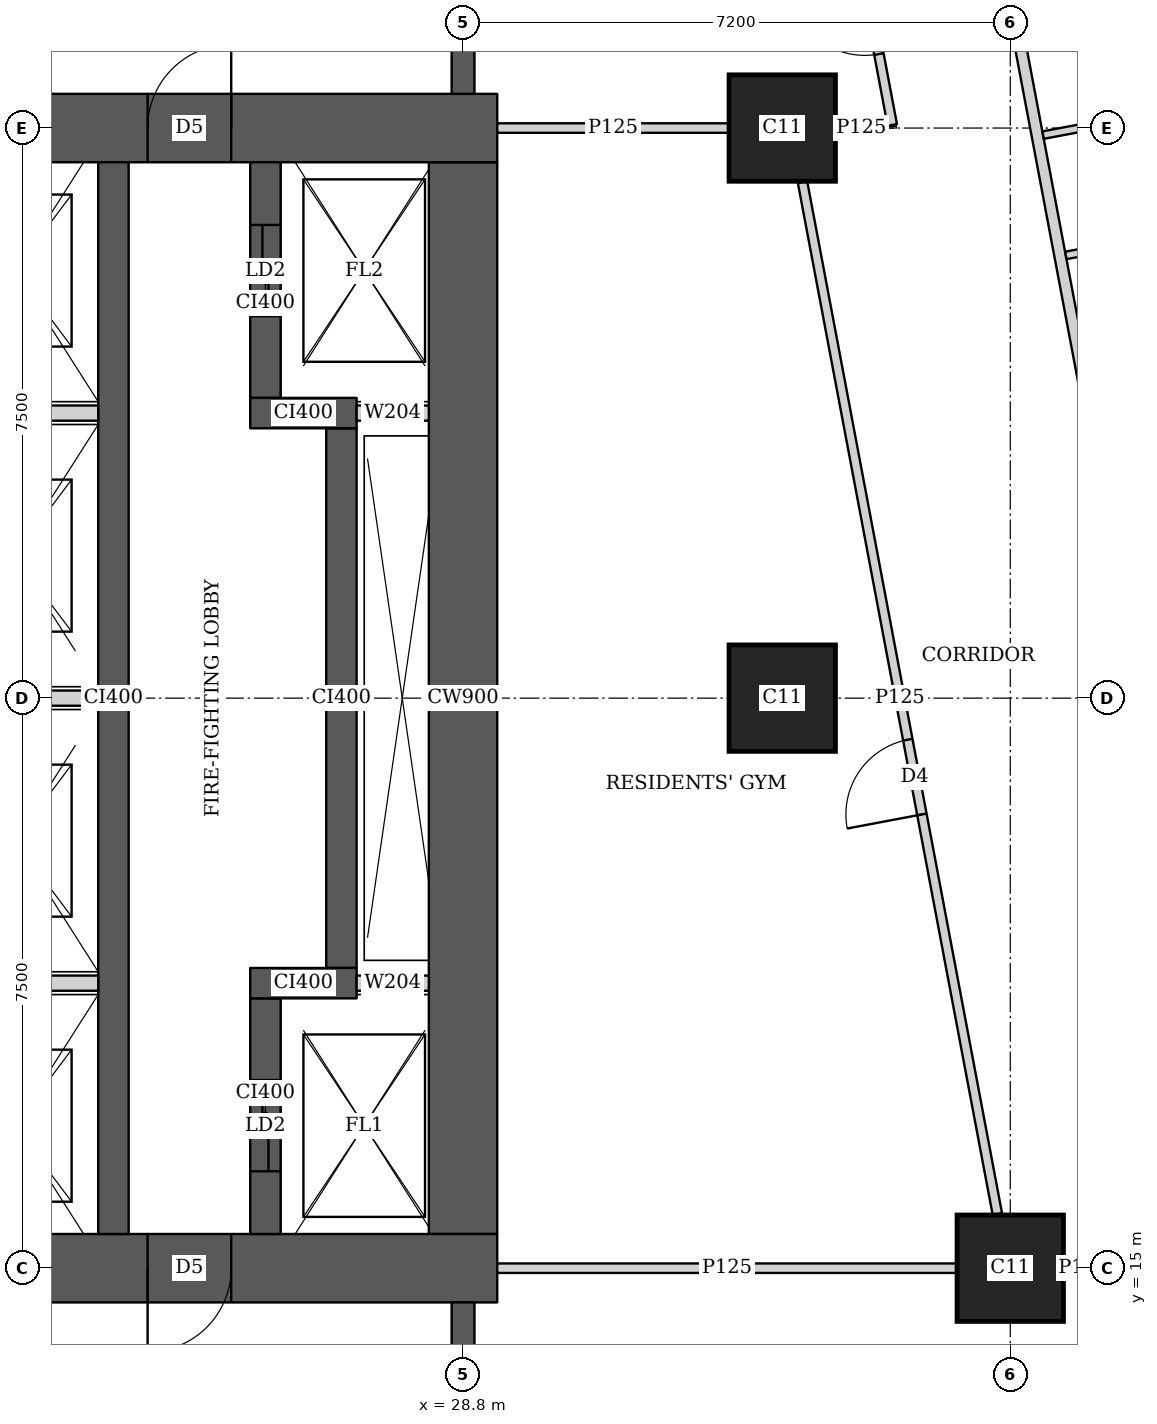
"""IFC4 building model, lengths in metres.
Left out: names, types, materials, properties, quantities, classifications, styles, units other than length and angle.
Written with IfcOpenShell. Run it as: python <this file> out.ifc"""

import sys

from ifc_helpers import new_model, si_unit, direction, frame, frame_2d, origin, origin_2d, place, context, subcontext, project, spatial, rectangle, extrude, element, fill, save


model = new_model("IFC4")
c1 = context("Model", 3, precision=1e-05, world=origin(), true_north=direction((0.0, 1.0)))
c2 = subcontext(c1, "Body", "Model", "MODEL_VIEW")
j1 = project(units=[si_unit("LENGTHUNIT", "METRE"), si_unit("PLANEANGLEUNIT", "RADIAN")], contexts=[c1])
p1 = place(None, origin())
s1 = spatial("IfcSite", under=j1, at=p1, CompositionType="ELEMENT")
p2 = place(p1, origin())
s2 = spatial("IfcBuilding", under=s1, at=p2, CompositionType="ELEMENT")
p3 = place(p2, frame((0.0, 0.0, 292.85)))
s3 = spatial("IfcBuildingStorey", under=s2, at=p3, CompositionType="ELEMENT", Elevation=292.85)
for number, where, z_axis, x_axis in (
    (1, (36.0, 15.0, 0.0), (0.0, 0.0, 1.0), (1.0, 0.0, 0.0)),
    (2, (33.0, 22.5, 0.0), (0.0, 0.0, 1.0), (1.0, 0.0, 0.0)),
    (3, (33.0, 30.0, 0.0), (0.0, 0.0, 1.0), (1.0, 0.0, 0.0)),
):
    element("IfcColumn", number, at=place(p3, frame(where, z_axis=z_axis, x_axis=x_axis)), inside=s3, PredefinedType="COLUMN", context=c2, shape_type="SweptSolid", body=[
        extrude(rectangle(XDim=1.4, YDim=1.4, at=origin_2d()), origin(), (0.0, 0.0, 1.0), 3.75),
    ])
p4 = place(p3, frame((13.95, 15.0, 0.0), z_axis=(0.0, 0.0, 1.0), x_axis=(1.0, 0.0, 0.0)))
e4 = element("IfcWall", 4, at=p4, inside=s3, PredefinedType="SHEAR", context=c2, shape_type="SweptSolid", body=[
    extrude(rectangle(XDim=15.3, YDim=0.9, at=frame_2d((7.65, 0.0))), origin(), (0.0, 0.0, 1.0), 3.75),
])
p5 = place(p4, frame((4.45, 0.0, 0.0)))
e5 = element("IfcOpeningElement", 5, at=p5, cuts=e4, PredefinedType="OPENING", context=c2, shape_type="SweptSolid", body=[
    extrude(rectangle(XDim=1.8, YDim=2.1, at=frame_2d((0.9, 1.05))), frame((0.0, 0.46, 0.0), z_axis=(0.0, -1.0, 0.0), x_axis=(1.0, 0.0, 0.0)), (0.0, 0.0, 1.0), 0.92),
])
p6 = place(p4, frame((10.7, 0.0, 0.0)))
e6 = element("IfcOpeningElement", 6, at=p6, cuts=e4, PredefinedType="OPENING", context=c2, shape_type="SweptSolid", body=[
    extrude(rectangle(XDim=1.1, YDim=2.1, at=frame_2d((0.55, 1.05))), frame((0.0, 0.46, 0.0), z_axis=(0.0, -1.0, 0.0), x_axis=(1.0, 0.0, 0.0)), (0.0, 0.0, 1.0), 0.92),
])
p7 = place(p3, frame((13.95, 30.0, 0.0), z_axis=(0.0, 0.0, 1.0), x_axis=(1.0, 0.0, 0.0)))
e7 = element("IfcWall", 7, at=p7, inside=s3, PredefinedType="SHEAR", context=c2, shape_type="SweptSolid", body=[
    extrude(rectangle(XDim=15.3, YDim=0.9, at=frame_2d((7.65, 0.0))), origin(), (0.0, 0.0, 1.0), 3.75),
])
p8 = place(p7, frame((4.45, 0.0, 0.0)))
e8 = element("IfcOpeningElement", 8, at=p8, cuts=e7, PredefinedType="OPENING", context=c2, shape_type="SweptSolid", body=[
    extrude(rectangle(XDim=1.8, YDim=2.1, at=frame_2d((0.9, 1.05))), frame((0.0, 0.46, 0.0), z_axis=(0.0, -1.0, 0.0), x_axis=(1.0, 0.0, 0.0)), (0.0, 0.0, 1.0), 0.92),
])
p9 = place(p7, frame((10.7, 0.0, 0.0)))
e9 = element("IfcOpeningElement", 9, at=p9, cuts=e7, PredefinedType="OPENING", context=c2, shape_type="SweptSolid", body=[
    extrude(rectangle(XDim=1.1, YDim=2.1, at=frame_2d((0.55, 1.05))), frame((0.0, 0.46, 0.0), z_axis=(0.0, -1.0, 0.0), x_axis=(1.0, 0.0, 0.0)), (0.0, 0.0, 1.0), 0.92),
])
p10 = place(p3, frame((28.8, 15.45, 0.0), z_axis=(0.0, 0.0, 1.0), x_axis=(0.0, 1.0, 0.0)))
e10 = element("IfcWall", 10, at=p10, inside=s3, PredefinedType="SHEAR", context=c2, shape_type="SweptSolid", body=[
    extrude(rectangle(XDim=14.1, YDim=0.9, at=frame_2d((7.05, 0.0))), origin(), (0.0, 0.0, 1.0), 3.75),
])
p11 = place(p3, frame((24.2, 15.45, 0.0), z_axis=(0.0, 0.0, 1.0), x_axis=(0.0, 1.0, 0.0)))
e11 = element("IfcWall", 11, at=p11, inside=s3, PredefinedType="SHEAR", context=c2, shape_type="SweptSolid", body=[
    extrude(rectangle(XDim=14.1, YDim=0.4, at=frame_2d((7.05, 0.0))), origin(), (0.0, 0.0, 1.0), 3.75),
])
p12 = place(p3, frame((26.2, 15.45, 0.0), z_axis=(0.0, 0.0, 1.0), x_axis=(0.0, 1.0, 0.0)))
e12 = element("IfcWall", 12, at=p12, inside=s3, PredefinedType="SHEAR", context=c2, shape_type="SweptSolid", body=[
    extrude(rectangle(XDim=3.1, YDim=0.4, at=frame_2d((1.55, 0.0))), origin(), (0.0, 0.0, 1.0), 3.75),
])
p13 = place(p12, frame((0.825, 0.0, 0.0)))
e13 = element("IfcOpeningElement", 13, at=p13, cuts=e12, PredefinedType="OPENING", context=c2, shape_type="SweptSolid", body=[
    extrude(rectangle(XDim=1.2, YDim=2.1, at=frame_2d((0.6, 1.05))), frame((0.0, 0.21, 0.0), z_axis=(0.0, -1.0, 0.0), x_axis=(1.0, 0.0, 0.0)), (0.0, 0.0, 1.0), 0.42),
])
p14 = place(p3, frame((26.0, 18.75, 0.0), z_axis=(0.0, 0.0, 1.0), x_axis=(1.0, 0.0, 0.0)))
e14 = element("IfcWall", 14, at=p14, inside=s3, PredefinedType="SHEAR", context=c2, shape_type="SweptSolid", body=[
    extrude(rectangle(XDim=1.4, YDim=0.4, at=frame_2d((0.7, 0.0))), origin(), (0.0, 0.0, 1.0), 3.75),
])
p15 = place(p3, frame((27.2, 18.95, 0.0), z_axis=(0.0, 0.0, 1.0), x_axis=(0.0, 1.0, 0.0)))
e15 = element("IfcWall", 15, at=p15, inside=s3, PredefinedType="SHEAR", context=c2, shape_type="SweptSolid", body=[
    extrude(rectangle(XDim=7.1, YDim=0.4, at=frame_2d((3.55, 0.0))), origin(), (0.0, 0.0, 1.0), 3.75),
])
p16 = place(p3, frame((26.0, 26.25, 0.0), z_axis=(0.0, 0.0, 1.0), x_axis=(1.0, 0.0, 0.0)))
e16 = element("IfcWall", 16, at=p16, inside=s3, PredefinedType="SHEAR", context=c2, shape_type="SweptSolid", body=[
    extrude(rectangle(XDim=1.4, YDim=0.4, at=frame_2d((0.7, 0.0))), origin(), (0.0, 0.0, 1.0), 3.75),
])
p17 = place(p3, frame((26.2, 26.45, 0.0), z_axis=(0.0, 0.0, 1.0), x_axis=(0.0, 1.0, 0.0)))
e17 = element("IfcWall", 17, at=p17, inside=s3, PredefinedType="SHEAR", context=c2, shape_type="SweptSolid", body=[
    extrude(rectangle(XDim=3.1, YDim=0.4, at=frame_2d((1.55, 0.0))), origin(), (0.0, 0.0, 1.0), 3.75),
])
p18 = place(p17, frame((1.075, 0.0, 0.0)))
e18 = element("IfcOpeningElement", 18, at=p18, cuts=e17, PredefinedType="OPENING", context=c2, shape_type="SweptSolid", body=[
    extrude(rectangle(XDim=1.2, YDim=2.1, at=frame_2d((0.6, 1.05))), frame((0.0, 0.21, 0.0), z_axis=(0.0, -1.0, 0.0), x_axis=(1.0, 0.0, 0.0)), (0.0, 0.0, 1.0), 0.42),
])
for number, where, z_axis, x_axis in (
    (19, (28.8, 10.35, 0.0), (0.0, 0.0, 1.0), (0.0, 1.0, 0.0)),
    (20, (28.8, 30.45, 0.0), (0.0, 0.0, 1.0), (0.0, 1.0, 0.0)),
):
    element("IfcWall", number, at=place(p3, frame(where, z_axis=z_axis, x_axis=x_axis)), inside=s3, PredefinedType="SHEAR", context=c2, shape_type="SweptSolid", body=[
        extrude(rectangle(XDim=4.2, YDim=0.3, at=frame_2d((2.1, 0.0))), origin(), (0.0, 0.0, 1.0), 3.75),
    ])
p19 = place(p3, frame((34.036, 42.186, 0.0), z_axis=(0.0, 0.0, 1.0), x_axis=(0.185593518645, -0.9826266055, 0.0)))
e21 = element("IfcWall", 21, at=p19, inside=s3, PredefinedType="SOLIDWALL", context=c2, shape_type="SweptSolid", body=[
    extrude(rectangle(XDim=35.961, YDim=0.15, at=frame_2d((17.98, 0.0))), origin(), (0.0, 0.0, 1.0), 2.4),
])
p20 = place(p19, frame((19.345, 0.0, 0.0)))
e22 = element("IfcOpeningElement", 22, at=p20, cuts=e21, PredefinedType="OPENING", context=c2, shape_type="SweptSolid", body=[
    extrude(rectangle(XDim=1.0, YDim=2.1, at=frame_2d((0.5, 1.05))), frame((0.0, 0.085, 0.0), z_axis=(0.0, -1.0, 0.0), x_axis=(1.0, 0.0, 0.0)), (0.0, 0.0, 1.0), 0.17),
])
p21 = place(p19, frame((33.774, 0.0, 0.0)))
e23 = element("IfcOpeningElement", 23, at=p21, cuts=e21, PredefinedType="OPENING", context=c2, shape_type="SweptSolid", body=[
    extrude(rectangle(XDim=1.0, YDim=2.1, at=frame_2d((0.5, 1.05))), frame((0.0, 0.085, 0.0), z_axis=(0.0, -1.0, 0.0), x_axis=(1.0, 0.0, 0.0)), (0.0, 0.0, 1.0), 0.17),
])
p22 = place(p3, frame((39.948, 28.932, 0.0), z_axis=(0.0, 0.0, 1.0), x_axis=(-0.982610347627, -0.185679575441, 0.0)))
e24 = element("IfcWall", 24, at=p22, inside=s3, PredefinedType="PARTITIONING", context=c2, shape_type="SweptSolid", body=[
    extrude(rectangle(XDim=3.274, YDim=0.1, at=frame_2d((1.637, 0.0))), origin(), (0.0, 0.0, 1.0), 3.4),
])
p23 = place(p3, frame((39.649, 30.515, 0.0), z_axis=(0.0, 0.0, 1.0), x_axis=(-0.982610347627, -0.185679575441, 0.0)))
e25 = element("IfcWall", 25, at=p23, inside=s3, PredefinedType="PARTITIONING", context=c2, shape_type="SweptSolid", body=[
    extrude(rectangle(XDim=3.274, YDim=0.1, at=frame_2d((1.637, 0.0))), origin(), (0.0, 0.0, 1.0), 2.4),
])
p24 = place(p3, frame((34.448, 30.04, 0.0), z_axis=(0.0, 0.0, 1.0), x_axis=(-0.185749459238, 0.982597139418, 0.0)))
e26 = element("IfcWall", 26, at=p24, inside=s3, PredefinedType="PARTITIONING", context=c2, shape_type="SweptSolid", body=[
    extrude(rectangle(XDim=4.883, YDim=0.125, at=frame_2d((2.441, 0.0))), origin(), (0.0, 0.0, 1.0), 2.4),
])
p25 = place(p24, frame((0.95, 0.0, 0.0)))
e27 = element("IfcOpeningElement", 27, at=p25, cuts=e26, PredefinedType="OPENING", context=c2, shape_type="SweptSolid", body=[
    extrude(rectangle(XDim=1.0, YDim=2.1, at=frame_2d((0.5, 1.05))), frame((0.0, 0.073, 0.0), z_axis=(0.0, -1.0, 0.0), x_axis=(1.0, 0.0, 0.0)), (0.0, 0.0, 1.0), 0.145),
])
p26 = place(p24, frame((3.225, 0.0, 0.0)))
e28 = element("IfcOpeningElement", 28, at=p26, cuts=e26, PredefinedType="OPENING", context=c2, shape_type="SweptSolid", body=[
    extrude(rectangle(XDim=1.0, YDim=2.1, at=frame_2d((0.5, 1.05))), frame((0.0, 0.073, 0.0), z_axis=(0.0, -1.0, 0.0), x_axis=(1.0, 0.0, 0.0)), (0.0, 0.0, 1.0), 0.145),
])
p27 = place(p3, frame((35.83, 15.713, 0.0), z_axis=(0.0, 0.0, 1.0), x_axis=(-0.185534724166, 0.982637708481, 0.0)))
e29 = element("IfcWall", 29, at=p27, inside=s3, PredefinedType="PARTITIONING", context=c2, shape_type="SweptSolid", body=[
    extrude(rectangle(XDim=13.814, YDim=0.125, at=frame_2d((6.907, 0.0))), origin(), (0.0, 0.0, 1.0), 2.4),
])
p28 = place(p27, frame((5.35, 0.0, 0.0)))
e30 = element("IfcOpeningElement", 30, at=p28, cuts=e29, PredefinedType="OPENING", context=c2, shape_type="SweptSolid", body=[
    extrude(rectangle(XDim=1.0, YDim=2.1, at=frame_2d((0.5, 1.05))), frame((0.0, 0.073, 0.0), z_axis=(0.0, -1.0, 0.0), x_axis=(1.0, 0.0, 0.0)), (0.0, 0.0, 1.0), 0.145),
])
p29 = place(p3, frame((29.25, 15.0, 0.0), z_axis=(0.0, 0.0, 1.0), x_axis=(1.0, 0.0, 0.0)))
e31 = element("IfcWall", 31, at=p29, inside=s3, PredefinedType="PARTITIONING", context=c2, shape_type="SweptSolid", body=[
    extrude(rectangle(XDim=6.049, YDim=0.125, at=frame_2d((3.024, 0.0))), origin(), (0.0, 0.0, 1.0), 2.5),
])
p30 = place(p3, frame((36.701, 15.0, 0.0), z_axis=(0.0, 0.0, 1.0), x_axis=(1.0, 0.0, 0.0)))
e32 = element("IfcWall", 32, at=p30, inside=s3, PredefinedType="PARTITIONING", context=c2, shape_type="SweptSolid", body=[
    extrude(rectangle(XDim=0.526, YDim=0.125, at=frame_2d((0.263, 0.0))), origin(), (0.0, 0.0, 1.0), 2.5),
])
p31 = place(p3, frame((29.25, 30.0, 0.0), z_axis=(0.0, 0.0, 1.0), x_axis=(1.0, 0.0, 0.0)))
e33 = element("IfcWall", 33, at=p31, inside=s3, PredefinedType="PARTITIONING", context=c2, shape_type="SweptSolid", body=[
    extrude(rectangle(XDim=3.049, YDim=0.125, at=frame_2d((1.524, 0.0))), origin(), (0.0, 0.0, 1.0), 3.4),
])
p32 = place(p3, frame((33.701, 30.0, 0.0), z_axis=(0.0, 0.0, 1.0), x_axis=(1.0, 0.0, 0.0)))
e34 = element("IfcWall", 34, at=p32, inside=s3, PredefinedType="PARTITIONING", context=c2, shape_type="SweptSolid", body=[
    extrude(rectangle(XDim=0.679, YDim=0.125, at=frame_2d((0.339, 0.0))), origin(), (0.0, 0.0, 1.0), 2.4),
])
for number, where, z_axis, x_axis in (
    (35, (21.8, 18.75, 0.0), (0.0, 0.0, 1.0), (1.0, 0.0, 0.0)),
    (36, (21.8, 22.5, 0.0), (0.0, 0.0, 1.0), (1.0, 0.0, 0.0)),
    (37, (21.8, 26.25, 0.0), (0.0, 0.0, 1.0), (1.0, 0.0, 0.0)),
):
    element("IfcWall", number, at=place(p3, frame(where, z_axis=z_axis, x_axis=x_axis)), inside=s3, PredefinedType="SOLIDWALL", context=c2, shape_type="SweptSolid", body=[
        extrude(rectangle(XDim=2.2, YDim=0.2, at=frame_2d((1.1, 0.0))), origin(), (0.0, 0.0, 1.0), 3.4),
    ])
for number, where, z_axis, x_axis in (
    (38, (27.4, 18.75, 0.0), (0.0, 0.0, 1.0), (1.0, 0.0, 0.0)),
    (39, (27.4, 26.25, 0.0), (0.0, 0.0, 1.0), (1.0, 0.0, 0.0)),
):
    element("IfcWall", number, at=place(p3, frame(where, z_axis=z_axis, x_axis=x_axis)), inside=s3, PredefinedType="SOLIDWALL", context=c2, shape_type="SweptSolid", body=[
        extrude(rectangle(XDim=0.95, YDim=0.2, at=frame_2d((0.475, 0.0))), origin(), (0.0, 0.0, 1.0), 3.4),
    ])
p33 = place(p28, origin())
e40 = element("IfcDoor", 40, at=p33, inside=s3, OperationType="SINGLE_SWING_LEFT", PredefinedType="DOOR", context=c2, shape_type="SweptSolid", body=[
    extrude(rectangle(XDim=1.0, YDim=2.1, at=frame_2d((0.5, 1.05))), frame((0.0, 0.025, 0.0), z_axis=(0.0, -1.0, 0.0), x_axis=(1.0, 0.0, 0.0)), (0.0, 0.0, 1.0), 0.05),
])
fill(e30, e40)
p34 = place(p25, origin())
e41 = element("IfcDoor", 41, at=p34, inside=s3, OperationType="SINGLE_SWING_RIGHT", PredefinedType="DOOR", context=c2, shape_type="SweptSolid", body=[
    extrude(rectangle(XDim=1.0, YDim=2.1, at=frame_2d((0.5, 1.05))), frame((0.0, 0.025, 0.0), z_axis=(0.0, -1.0, 0.0), x_axis=(1.0, 0.0, 0.0)), (0.0, 0.0, 1.0), 0.05),
])
fill(e27, e41)
p35 = place(p6, origin())
e42 = element("IfcDoor", 42, at=p35, inside=s3, OperationType="SINGLE_SWING_RIGHT", PredefinedType="DOOR", context=c2, shape_type="SweptSolid", body=[
    extrude(rectangle(XDim=1.1, YDim=2.1, at=frame_2d((0.55, 1.05))), frame((0.0, 0.025, 0.0), z_axis=(0.0, -1.0, 0.0), x_axis=(1.0, 0.0, 0.0)), (0.0, 0.0, 1.0), 0.05),
])
fill(e6, e42)
p36 = place(p9, origin())
e43 = element("IfcDoor", 43, at=p36, inside=s3, OperationType="SINGLE_SWING_RIGHT", PredefinedType="DOOR", context=c2, shape_type="SweptSolid", body=[
    extrude(rectangle(XDim=1.1, YDim=2.1, at=frame_2d((0.55, 1.05))), frame((0.0, 0.025, 0.0), z_axis=(0.0, -1.0, 0.0), x_axis=(1.0, 0.0, 0.0)), (0.0, 0.0, 1.0), 0.05),
])
fill(e9, e43)
p37 = place(p13, origin())
e44 = element("IfcDoor", 44, at=p37, inside=s3, OperationType="DOUBLE_DOOR_SLIDING", PredefinedType="DOOR", context=c2, shape_type="SweptSolid", body=[
    extrude(rectangle(XDim=1.2, YDim=2.1, at=frame_2d((0.6, 1.05))), frame((0.0, 0.025, 0.0), z_axis=(0.0, -1.0, 0.0), x_axis=(1.0, 0.0, 0.0)), (0.0, 0.0, 1.0), 0.05),
])
fill(e13, e44)
p38 = place(p18, origin())
e45 = element("IfcDoor", 45, at=p38, inside=s3, OperationType="DOUBLE_DOOR_SLIDING", PredefinedType="DOOR", context=c2, shape_type="SweptSolid", body=[
    extrude(rectangle(XDim=1.2, YDim=2.1, at=frame_2d((0.6, 1.05))), frame((0.0, 0.025, 0.0), z_axis=(0.0, -1.0, 0.0), x_axis=(1.0, 0.0, 0.0)), (0.0, 0.0, 1.0), 0.05),
])
fill(e18, e45)
save(model, sys.argv[1])
